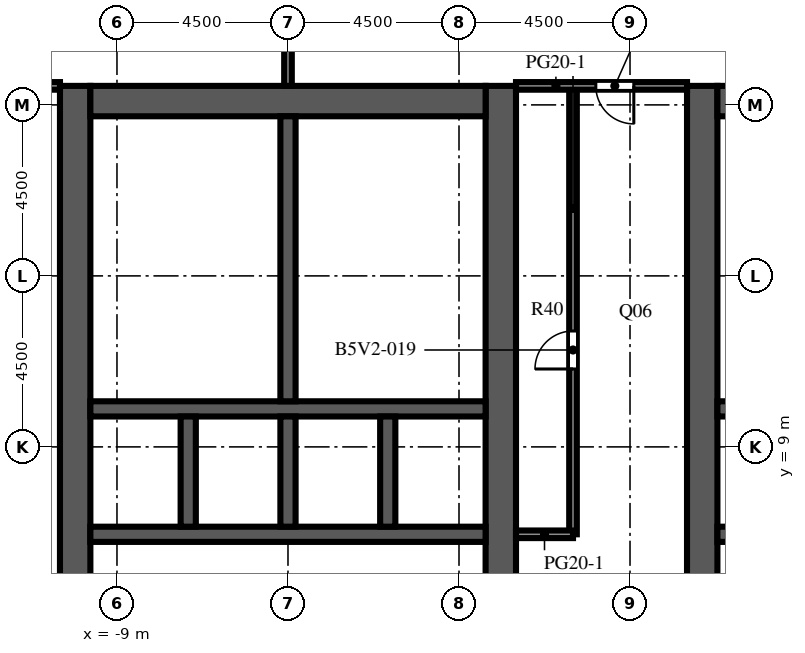
"""IFC4 building model, lengths in metres.
Left out: names, types, materials, properties, quantities, classifications, styles, units other than length and angle.
Written with IfcOpenShell. Run it as: python <this file> out.ifc"""

import sys

from ifc_helpers import new_model, si_unit, direction, frame, frame_2d, origin, place, context, subcontext, project, spatial, rectangle, extrude, element, fill, save


model = new_model("IFC4")
c1 = context("Model", 3, precision=1e-05, world=origin(), true_north=direction((0.0, 1.0)))
c2 = subcontext(c1, "Body", "Model", "MODEL_VIEW")
j1 = project(units=[si_unit("LENGTHUNIT", "METRE"), si_unit("PLANEANGLEUNIT", "RADIAN")], contexts=[c1])
p1 = place(None, origin())
s1 = spatial("IfcSite", under=j1, at=p1, CompositionType="ELEMENT")
p2 = place(p1, origin())
s2 = spatial("IfcBuilding", under=s1, at=p2, CompositionType="ELEMENT")
p3 = place(p2, frame((0.0, 0.0, 177.3)))
s3 = spatial("IfcBuildingStorey", under=s2, at=p3, CompositionType="ELEMENT", Elevation=177.3)
p4 = place(p3, frame((-10.1, -9.0, 0.0), z_axis=(0.0, 0.0, 1.0), x_axis=(0.0, 1.0, 0.0)))
e1 = element("IfcWall", 1, at=p4, inside=s3, PredefinedType="SHEAR", context=c2, shape_type="SweptSolid", body=[
    extrude(rectangle(XDim=27.5, YDim=0.8, at=frame_2d((13.75, 0.0))), origin(), (0.0, 0.0, 1.0), 4.1),
])
p5 = place(p4, frame((12.55, 0.0, 0.0)))
e2 = element("IfcOpeningElement", 2, at=p5, cuts=e1, PredefinedType="OPENING", context=c2, shape_type="SweptSolid", body=[
    extrude(rectangle(XDim=2.4, YDim=2.4, at=frame_2d((1.2, 1.2))), frame((0.0, 0.41, 0.0), z_axis=(0.0, -1.0, 0.0), x_axis=(1.0, 0.0, 0.0)), (0.0, 0.0, 1.0), 0.82),
])
p6 = place(p4, frame((6.825, 0.0, 0.0)))
e3 = element("IfcOpeningElement", 3, at=p6, cuts=e1, PredefinedType="OPENING", context=c2, shape_type="SweptSolid", body=[
    extrude(rectangle(XDim=1.2, YDim=2.1, at=frame_2d((0.6, 1.05))), frame((0.0, 0.41, 0.0), z_axis=(0.0, -1.0, 0.0), x_axis=(1.0, 0.0, 0.0)), (0.0, 0.0, 1.0), 0.82),
])
p7 = place(p4, frame((19.475, 0.0, 0.0)))
e4 = element("IfcOpeningElement", 4, at=p7, cuts=e1, PredefinedType="OPENING", context=c2, shape_type="SweptSolid", body=[
    extrude(rectangle(XDim=1.2, YDim=2.1, at=frame_2d((0.6, 1.05))), frame((0.0, 0.41, 0.0), z_axis=(0.0, -1.0, 0.0), x_axis=(1.0, 0.0, 0.0)), (0.0, 0.0, 1.0), 0.82),
])
p8 = place(p3, frame((1.1, -9.0, 0.0), z_axis=(0.0, 0.0, 1.0), x_axis=(0.0, 1.0, 0.0)))
e5 = element("IfcWall", 5, at=p8, inside=s3, PredefinedType="SHEAR", context=c2, shape_type="SweptSolid", body=[
    extrude(rectangle(XDim=27.5, YDim=0.8, at=frame_2d((13.75, 0.0))), origin(), (0.0, 0.0, 1.0), 4.1),
])
p9 = place(p8, frame((12.55, 0.0, 0.0)))
e6 = element("IfcOpeningElement", 6, at=p9, cuts=e5, PredefinedType="OPENING", context=c2, shape_type="SweptSolid", body=[
    extrude(rectangle(XDim=2.4, YDim=2.4, at=frame_2d((1.2, 1.2))), frame((0.0, 0.41, 0.0), z_axis=(0.0, -1.0, 0.0), x_axis=(1.0, 0.0, 0.0)), (0.0, 0.0, 1.0), 0.82),
])
p10 = place(p8, frame((3.85, 0.0, 0.0)))
e7 = element("IfcOpeningElement", 7, at=p10, cuts=e5, PredefinedType="OPENING", context=c2, shape_type="SweptSolid", body=[
    extrude(rectangle(XDim=0.95, YDim=2.1, at=frame_2d((0.475, 1.05))), frame((0.0, 0.41, 0.0), z_axis=(0.0, -1.0, 0.0), x_axis=(1.0, 0.0, 0.0)), (0.0, 0.0, 1.0), 0.82),
])
p11 = place(p8, frame((23.475, 0.0, 0.0)))
e8 = element("IfcOpeningElement", 8, at=p11, cuts=e5, PredefinedType="OPENING", context=c2, shape_type="SweptSolid", body=[
    extrude(rectangle(XDim=1.2, YDim=2.1, at=frame_2d((0.6, 1.05))), frame((0.0, 0.41, 0.0), z_axis=(0.0, -1.0, 0.0), x_axis=(1.0, 0.0, 0.0)), (0.0, 0.0, 1.0), 0.82),
])
p12 = place(p3, frame((-9.7, 18.1, 0.0), z_axis=(0.0, 0.0, 1.0), x_axis=(1.0, 0.0, 0.0)))
e9 = element("IfcWall", 9, at=p12, inside=s3, PredefinedType="SHEAR", context=c2, shape_type="SweptSolid", body=[
    extrude(rectangle(XDim=10.4, YDim=0.8, at=frame_2d((5.2, 0.0))), origin(), (0.0, 0.0, 1.0), 4.1),
])
p13 = place(p3, frame((-9.7, 6.7, 0.0), z_axis=(0.0, 0.0, 1.0), x_axis=(1.0, 0.0, 0.0)))
e10 = element("IfcWall", 10, at=p13, inside=s3, PredefinedType="SHEAR", context=c2, shape_type="SweptSolid", body=[
    extrude(rectangle(XDim=10.4, YDim=0.4, at=frame_2d((5.2, 0.0))), origin(), (0.0, 0.0, 1.0), 4.1),
])
p14 = place(p13, frame((3.337, 0.0, 0.0)))
e11 = element("IfcOpeningElement", 11, at=p14, cuts=e10, PredefinedType="OPENING", context=c2, shape_type="SweptSolid", body=[
    extrude(rectangle(XDim=1.1, YDim=2.1, at=frame_2d((0.55, 1.05))), frame((0.0, 0.21, 0.0), z_axis=(0.0, -1.0, 0.0), x_axis=(1.0, 0.0, 0.0)), (0.0, 0.0, 1.0), 0.42),
])
p15 = place(p13, frame((5.962, 0.0, 0.0)))
e12 = element("IfcOpeningElement", 12, at=p15, cuts=e10, PredefinedType="OPENING", context=c2, shape_type="SweptSolid", body=[
    extrude(rectangle(XDim=1.1, YDim=2.1, at=frame_2d((0.55, 1.05))), frame((0.0, 0.21, 0.0), z_axis=(0.0, -1.0, 0.0), x_axis=(1.0, 0.0, 0.0)), (0.0, 0.0, 1.0), 0.42),
])
p16 = place(p13, frame((8.663, 0.0, 0.0)))
e13 = element("IfcOpeningElement", 13, at=p16, cuts=e10, PredefinedType="OPENING", context=c2, shape_type="SweptSolid", body=[
    extrude(rectangle(XDim=1.1, YDim=2.1, at=frame_2d((0.55, 1.05))), frame((0.0, 0.21, 0.0), z_axis=(0.0, -1.0, 0.0), x_axis=(1.0, 0.0, 0.0)), (0.0, 0.0, 1.0), 0.42),
])
p17 = place(p13, frame((0.688, 0.0, 0.0)))
e14 = element("IfcOpeningElement", 14, at=p17, cuts=e10, PredefinedType="OPENING", context=c2, shape_type="SweptSolid", body=[
    extrude(rectangle(XDim=1.0, YDim=2.1, at=frame_2d((0.5, 1.05))), frame((0.0, 0.21, 0.0), z_axis=(0.0, -1.0, 0.0), x_axis=(1.0, 0.0, 0.0)), (0.0, 0.0, 1.0), 0.42),
])
p18 = place(p3, frame((-9.7, 10.0, 0.0), z_axis=(0.0, 0.0, 1.0), x_axis=(1.0, 0.0, 0.0)))
e15 = element("IfcWall", 15, at=p18, inside=s3, PredefinedType="SHEAR", context=c2, shape_type="SweptSolid", body=[
    extrude(rectangle(XDim=10.4, YDim=0.4, at=frame_2d((5.2, 0.0))), origin(), (0.0, 0.0, 1.0), 4.1),
])
for number, where, z_axis, x_axis in (
    (16, (-7.125, 6.9, 0.0), (0.0, 0.0, 1.0), (0.0, 1.0, 0.0)),
    (17, (-4.5, 6.9, 0.0), (0.0, 0.0, 1.0), (0.0, 1.0, 0.0)),
    (18, (-1.875, 6.9, 0.0), (0.0, 0.0, 1.0), (0.0, 1.0, 0.0)),
):
    element("IfcWall", number, at=place(p3, frame(where, z_axis=z_axis, x_axis=x_axis)), inside=s3, PredefinedType="SHEAR", context=c2, shape_type="SweptSolid", body=[
        extrude(rectangle(XDim=2.9, YDim=0.4, at=frame_2d((1.45, 0.0))), origin(), (0.0, 0.0, 1.0), 4.1),
    ])
p19 = place(p3, frame((-4.5, 10.2, 0.0), z_axis=(0.0, 0.0, 1.0), x_axis=(0.0, 1.0, 0.0)))
e19 = element("IfcWall", 19, at=p19, inside=s3, PredefinedType="SHEAR", context=c2, shape_type="SweptSolid", body=[
    extrude(rectangle(XDim=7.5, YDim=0.4, at=frame_2d((3.75, 0.0))), origin(), (0.0, 0.0, 1.0), 4.1),
])
p20 = place(p3, frame((6.4, -9.0, 0.0), z_axis=(0.0, 0.0, 1.0), x_axis=(0.0, 1.0, 0.0)))
e20 = element("IfcWall", 20, at=p20, inside=s3, PredefinedType="SHEAR", context=c2, shape_type="SweptSolid", body=[
    extrude(rectangle(XDim=27.5, YDim=0.8, at=frame_2d((13.75, 0.0))), origin(), (0.0, 0.0, 1.0), 4.1),
])
p21 = place(p20, frame((12.55, 0.0, 0.0)))
e21 = element("IfcOpeningElement", 21, at=p21, cuts=e20, PredefinedType="OPENING", context=c2, shape_type="SweptSolid", body=[
    extrude(rectangle(XDim=2.4, YDim=2.4, at=frame_2d((1.2, 1.2))), frame((0.0, 0.41, 0.0), z_axis=(0.0, -1.0, 0.0), x_axis=(1.0, 0.0, 0.0)), (0.0, 0.0, 1.0), 0.82),
])
p22 = place(p20, frame((3.85, 0.0, 0.0)))
e22 = element("IfcOpeningElement", 22, at=p22, cuts=e20, PredefinedType="OPENING", context=c2, shape_type="SweptSolid", body=[
    extrude(rectangle(XDim=0.95, YDim=2.1, at=frame_2d((0.475, 1.05))), frame((0.0, 0.41, 0.0), z_axis=(0.0, -1.0, 0.0), x_axis=(1.0, 0.0, 0.0)), (0.0, 0.0, 1.0), 0.82),
])
p23 = place(p20, frame((23.475, 0.0, 0.0)))
e23 = element("IfcOpeningElement", 23, at=p23, cuts=e20, PredefinedType="OPENING", context=c2, shape_type="SweptSolid", body=[
    extrude(rectangle(XDim=1.2, YDim=2.1, at=frame_2d((0.6, 1.05))), frame((0.0, 0.41, 0.0), z_axis=(0.0, -1.0, 0.0), x_axis=(1.0, 0.0, 0.0)), (0.0, 0.0, 1.0), 0.82),
])
p24 = place(p3, frame((6.8, 18.1, 0.0), z_axis=(0.0, 0.0, 1.0), x_axis=(1.0, 0.0, 0.0)))
e24 = element("IfcWall", 24, at=p24, inside=s3, PredefinedType="SHEAR", context=c2, shape_type="SweptSolid", body=[
    extrude(rectangle(XDim=10.4, YDim=0.8, at=frame_2d((5.2, 0.0))), origin(), (0.0, 0.0, 1.0), 4.1),
])
p25 = place(p3, frame((6.8, 6.7, 0.0), z_axis=(0.0, 0.0, 1.0), x_axis=(1.0, 0.0, 0.0)))
e25 = element("IfcWall", 25, at=p25, inside=s3, PredefinedType="SHEAR", context=c2, shape_type="SweptSolid", body=[
    extrude(rectangle(XDim=10.4, YDim=0.4, at=frame_2d((5.2, 0.0))), origin(), (0.0, 0.0, 1.0), 4.1),
])
p26 = place(p25, frame((3.337, 0.0, 0.0)))
e26 = element("IfcOpeningElement", 26, at=p26, cuts=e25, PredefinedType="OPENING", context=c2, shape_type="SweptSolid", body=[
    extrude(rectangle(XDim=1.1, YDim=2.1, at=frame_2d((0.55, 1.05))), frame((0.0, 0.21, 0.0), z_axis=(0.0, -1.0, 0.0), x_axis=(1.0, 0.0, 0.0)), (0.0, 0.0, 1.0), 0.42),
])
p27 = place(p25, frame((5.962, 0.0, 0.0)))
e27 = element("IfcOpeningElement", 27, at=p27, cuts=e25, PredefinedType="OPENING", context=c2, shape_type="SweptSolid", body=[
    extrude(rectangle(XDim=1.1, YDim=2.1, at=frame_2d((0.55, 1.05))), frame((0.0, 0.21, 0.0), z_axis=(0.0, -1.0, 0.0), x_axis=(1.0, 0.0, 0.0)), (0.0, 0.0, 1.0), 0.42),
])
p28 = place(p25, frame((8.663, 0.0, 0.0)))
e28 = element("IfcOpeningElement", 28, at=p28, cuts=e25, PredefinedType="OPENING", context=c2, shape_type="SweptSolid", body=[
    extrude(rectangle(XDim=1.1, YDim=2.1, at=frame_2d((0.55, 1.05))), frame((0.0, 0.21, 0.0), z_axis=(0.0, -1.0, 0.0), x_axis=(1.0, 0.0, 0.0)), (0.0, 0.0, 1.0), 0.42),
])
p29 = place(p25, frame((0.688, 0.0, 0.0)))
e29 = element("IfcOpeningElement", 29, at=p29, cuts=e25, PredefinedType="OPENING", context=c2, shape_type="SweptSolid", body=[
    extrude(rectangle(XDim=1.0, YDim=2.1, at=frame_2d((0.5, 1.05))), frame((0.0, 0.21, 0.0), z_axis=(0.0, -1.0, 0.0), x_axis=(1.0, 0.0, 0.0)), (0.0, 0.0, 1.0), 0.42),
])
p30 = place(p3, frame((6.8, 10.0, 0.0), z_axis=(0.0, 0.0, 1.0), x_axis=(1.0, 0.0, 0.0)))
e30 = element("IfcWall", 30, at=p30, inside=s3, PredefinedType="SHEAR", context=c2, shape_type="SweptSolid", body=[
    extrude(rectangle(XDim=10.4, YDim=0.4, at=frame_2d((5.2, 0.0))), origin(), (0.0, 0.0, 1.0), 4.1),
])
p31 = place(p3, frame((-0.6, 12.45, 0.0), z_axis=(0.0, 0.0, 1.0), x_axis=(1.0, 0.0, 0.0)))
e31 = element("IfcWall", 31, at=p31, inside=s3, PredefinedType="PARTITIONING", context=c2, shape_type="SweptSolid", body=[
    extrude(rectangle(XDim=1.3, YDim=0.1, at=frame_2d((0.65, 0.0))), origin(), (0.0, 0.0, 1.0), 3.65),
])
p32 = place(p31, frame((0.2, 0.0, 0.0)))
e32 = element("IfcOpeningElement", 32, at=p32, cuts=e31, PredefinedType="OPENING", context=c2, shape_type="SweptSolid", body=[
    extrude(rectangle(XDim=0.9, YDim=2.1, at=frame_2d((0.45, 1.05))), frame((0.0, 0.06, 0.0), z_axis=(0.0, -1.0, 0.0), x_axis=(1.0, 0.0, 0.0)), (0.0, 0.0, 1.0), 0.12),
])
p33 = place(p3, frame((-4.3, 12.45, 0.0), z_axis=(0.0, 0.0, 1.0), x_axis=(1.0, 0.0, 0.0)))
e33 = element("IfcWall", 33, at=p33, inside=s3, PredefinedType="PARTITIONING", context=c2, shape_type="SweptSolid", body=[
    extrude(rectangle(XDim=3.7, YDim=0.1, at=frame_2d((1.85, 0.0))), origin(), (0.0, 0.0, 1.0), 3.65),
])
p34 = place(p3, frame((-0.6, 12.45, 0.0), z_axis=(0.0, 0.0, 1.0), x_axis=(0.0, 1.0, 0.0)))
e34 = element("IfcWall", 34, at=p34, inside=s3, PredefinedType="PARTITIONING", context=c2, shape_type="SweptSolid", body=[
    extrude(rectangle(XDim=2.625, YDim=0.1, at=frame_2d((1.312, 0.0))), origin(), (0.0, 0.0, 1.0), 3.65),
])
p35 = place(p34, frame((0.812, 0.0, 0.0)))
e35 = element("IfcOpeningElement", 35, at=p35, cuts=e34, PredefinedType="OPENING", context=c2, shape_type="SweptSolid", body=[
    extrude(rectangle(XDim=1.0, YDim=2.1, at=frame_2d((0.5, 1.05))), frame((0.0, 0.06, 0.0), z_axis=(0.0, -1.0, 0.0), x_axis=(1.0, 0.0, 0.0)), (0.0, 0.0, 1.0), 0.12),
])
p36 = place(p3, frame((-0.6, 15.075, 0.0), z_axis=(0.0, 0.0, 1.0), x_axis=(0.0, 1.0, 0.0)))
e36 = element("IfcWall", 36, at=p36, inside=s3, PredefinedType="PARTITIONING", context=c2, shape_type="SweptSolid", body=[
    extrude(rectangle(XDim=2.625, YDim=0.1, at=frame_2d((1.312, 0.0))), origin(), (0.0, 0.0, 1.0), 3.65),
])
p37 = place(p36, frame((0.812, 0.0, 0.0)))
e37 = element("IfcOpeningElement", 37, at=p37, cuts=e36, PredefinedType="OPENING", context=c2, shape_type="SweptSolid", body=[
    extrude(rectangle(XDim=1.0, YDim=2.1, at=frame_2d((0.5, 1.05))), frame((0.0, 0.06, 0.0), z_axis=(0.0, -1.0, 0.0), x_axis=(1.0, 0.0, 0.0)), (0.0, 0.0, 1.0), 0.12),
])
p38 = place(p3, frame((-4.3, 15.075, 0.0), z_axis=(0.0, 0.0, 1.0), x_axis=(1.0, 0.0, 0.0)))
e38 = element("IfcWall", 38, at=p38, inside=s3, PredefinedType="PARTITIONING", context=c2, shape_type="SweptSolid", body=[
    extrude(rectangle(XDim=3.7, YDim=0.1, at=frame_2d((1.85, 0.0))), origin(), (0.0, 0.0, 1.0), 3.65),
])
p39 = place(p3, frame((6.8, 12.45, 0.0), z_axis=(0.0, 0.0, 1.0), x_axis=(1.0, 0.0, 0.0)))
e39 = element("IfcWall", 39, at=p39, inside=s3, PredefinedType="PARTITIONING", context=c2, shape_type="SweptSolid", body=[
    extrude(rectangle(XDim=1.3, YDim=0.1, at=frame_2d((0.65, 0.0))), origin(), (0.0, 0.0, 1.0), 3.65),
])
p40 = place(p39, frame((0.2, 0.0, 0.0)))
e40 = element("IfcOpeningElement", 40, at=p40, cuts=e39, PredefinedType="OPENING", context=c2, shape_type="SweptSolid", body=[
    extrude(rectangle(XDim=0.9, YDim=2.1, at=frame_2d((0.45, 1.05))), frame((0.0, 0.06, 0.0), z_axis=(0.0, -1.0, 0.0), x_axis=(1.0, 0.0, 0.0)), (0.0, 0.0, 1.0), 0.12),
])
p41 = place(p3, frame((-4.5, 18.5, 0.0), z_axis=(0.0, 0.0, 1.0), x_axis=(0.0, 1.0, 0.0)))
e41 = element("IfcWall", 41, at=p41, inside=s3, PredefinedType="PARTITIONING", context=c2, shape_type="SweptSolid", body=[
    extrude(rectangle(XDim=8.0, YDim=0.2, at=frame_2d((4.0, 0.0))), origin(), (0.0, 0.0, 1.0), 3.65),
])
p42 = place(p3, frame((3.0, 6.7, 0.0), z_axis=(0.0, 0.0, 1.0), x_axis=(0.0, 1.0, 0.0)))
e42 = element("IfcWall", 42, at=p42, inside=s3, PredefinedType="PARTITIONING", context=c2, shape_type="SweptSolid", body=[
    extrude(rectangle(XDim=11.8, YDim=0.2, at=frame_2d((5.9, 0.0))), origin(), (0.0, 0.0, 1.0), 3.65),
])
p43 = place(p42, frame((4.35, 0.0, 0.0)))
e43 = element("IfcOpeningElement", 43, at=p43, cuts=e42, PredefinedType="OPENING", context=c2, shape_type="SweptSolid", body=[
    extrude(rectangle(XDim=1.0, YDim=2.1, at=frame_2d((0.5, 1.05))), frame((0.0, 0.11, 0.0), z_axis=(0.0, -1.0, 0.0), x_axis=(1.0, 0.0, 0.0)), (0.0, 0.0, 1.0), 0.22),
])
p44 = place(p3, frame((1.5, 6.7, 0.0), z_axis=(0.0, 0.0, 1.0), x_axis=(1.0, 0.0, 0.0)))
e44 = element("IfcWall", 44, at=p44, inside=s3, PredefinedType="PARTITIONING", context=c2, shape_type="SweptSolid", body=[
    extrude(rectangle(XDim=1.5, YDim=0.2, at=frame_2d((0.75, 0.0))), origin(), (0.0, 0.0, 1.0), 3.65),
])
p45 = place(p3, frame((-13.5, 18.5, 0.0), z_axis=(0.0, 0.0, 1.0), x_axis=(1.0, 0.0, 0.0)))
e45 = element("IfcWall", 45, at=p45, inside=s3, PredefinedType="PARTITIONING", context=c2, shape_type="SweptSolid", body=[
    extrude(rectangle(XDim=3.0, YDim=0.2, at=frame_2d((1.5, 0.0))), origin(), (0.0, 0.0, 1.0), 3.65),
])
p46 = place(p45, frame((1.1, 0.0, 0.0)))
e46 = element("IfcOpeningElement", 46, at=p46, cuts=e45, PredefinedType="OPENING", context=c2, shape_type="SweptSolid", body=[
    extrude(rectangle(XDim=1.0, YDim=2.1, at=frame_2d((0.5, 1.05))), frame((0.0, 0.11, 0.0), z_axis=(0.0, -1.0, 0.0), x_axis=(1.0, 0.0, 0.0)), (0.0, 0.0, 1.0), 0.22),
])
p47 = place(p3, frame((1.5, 18.5, 0.0), z_axis=(0.0, 0.0, 1.0), x_axis=(1.0, 0.0, 0.0)))
e47 = element("IfcWall", 47, at=p47, inside=s3, PredefinedType="PARTITIONING", context=c2, shape_type="SweptSolid", body=[
    extrude(rectangle(XDim=4.5, YDim=0.2, at=frame_2d((2.25, 0.0))), origin(), (0.0, 0.0, 1.0), 3.65),
])
p48 = place(p47, frame((2.1, 0.0, 0.0)))
e48 = element("IfcOpeningElement", 48, at=p48, cuts=e47, PredefinedType="OPENING", context=c2, shape_type="SweptSolid", body=[
    extrude(rectangle(XDim=1.0, YDim=2.1, at=frame_2d((0.5, 1.05))), frame((0.0, 0.11, 0.0), z_axis=(0.0, -1.0, 0.0), x_axis=(1.0, 0.0, 0.0)), (0.0, 0.0, 1.0), 0.22),
])
p49 = place(p14, origin())
e49 = element("IfcDoor", 49, at=p49, inside=s3, OperationType="DOUBLE_DOOR_SLIDING", PredefinedType="DOOR", context=c2, shape_type="SweptSolid", body=[
    extrude(rectangle(XDim=1.1, YDim=2.1, at=frame_2d((0.55, 1.05))), frame((0.0, 0.025, 0.0), z_axis=(0.0, -1.0, 0.0), x_axis=(1.0, 0.0, 0.0)), (0.0, 0.0, 1.0), 0.05),
])
fill(e11, e49)
p50 = place(p15, origin())
e50 = element("IfcDoor", 50, at=p50, inside=s3, OperationType="DOUBLE_DOOR_SLIDING", PredefinedType="DOOR", context=c2, shape_type="SweptSolid", body=[
    extrude(rectangle(XDim=1.1, YDim=2.1, at=frame_2d((0.55, 1.05))), frame((0.0, 0.025, 0.0), z_axis=(0.0, -1.0, 0.0), x_axis=(1.0, 0.0, 0.0)), (0.0, 0.0, 1.0), 0.05),
])
fill(e12, e50)
p51 = place(p16, origin())
e51 = element("IfcDoor", 51, at=p51, inside=s3, OperationType="DOUBLE_DOOR_SLIDING", PredefinedType="DOOR", context=c2, shape_type="SweptSolid", body=[
    extrude(rectangle(XDim=1.1, YDim=2.1, at=frame_2d((0.55, 1.05))), frame((0.0, 0.025, 0.0), z_axis=(0.0, -1.0, 0.0), x_axis=(1.0, 0.0, 0.0)), (0.0, 0.0, 1.0), 0.05),
])
fill(e13, e51)
p52 = place(p5, origin())
e52 = element("IfcDoor", 52, at=p52, inside=s3, OperationType="DOUBLE_DOOR_DOUBLE_SWING", PredefinedType="DOOR", context=c2, shape_type="SweptSolid", body=[
    extrude(rectangle(XDim=2.4, YDim=2.4, at=frame_2d((1.2, 1.2))), frame((0.0, 0.025, 0.0), z_axis=(0.0, -1.0, 0.0), x_axis=(1.0, 0.0, 0.0)), (0.0, 0.0, 1.0), 0.05),
])
fill(e2, e52)
p53 = place(p9, origin())
e53 = element("IfcDoor", 53, at=p53, inside=s3, OperationType="DOUBLE_DOOR_DOUBLE_SWING", PredefinedType="DOOR", context=c2, shape_type="SweptSolid", body=[
    extrude(rectangle(XDim=2.4, YDim=2.4, at=frame_2d((1.2, 1.2))), frame((0.0, 0.025, 0.0), z_axis=(0.0, -1.0, 0.0), x_axis=(1.0, 0.0, 0.0)), (0.0, 0.0, 1.0), 0.05),
])
fill(e6, e53)
p54 = place(p21, origin())
e54 = element("IfcDoor", 54, at=p54, inside=s3, OperationType="DOUBLE_DOOR_DOUBLE_SWING", PredefinedType="DOOR", context=c2, shape_type="SweptSolid", body=[
    extrude(rectangle(XDim=2.4, YDim=2.4, at=frame_2d((1.2, 1.2))), frame((0.0, 0.025, 0.0), z_axis=(0.0, -1.0, 0.0), x_axis=(1.0, 0.0, 0.0)), (0.0, 0.0, 1.0), 0.05),
])
fill(e21, e54)
p55 = place(p7, origin())
e55 = element("IfcDoor", 55, at=p55, inside=s3, OperationType="SINGLE_SWING_LEFT", PredefinedType="DOOR", context=c2, shape_type="SweptSolid", body=[
    extrude(rectangle(XDim=1.2, YDim=2.1, at=frame_2d((0.6, 1.05))), frame((0.0, 0.025, 0.0), z_axis=(0.0, -1.0, 0.0), x_axis=(1.0, 0.0, 0.0)), (0.0, 0.0, 1.0), 0.05),
])
fill(e4, e55)
p56 = place(p17, origin())
e56 = element("IfcDoor", 56, at=p56, inside=s3, OperationType="SINGLE_SWING_LEFT", PredefinedType="DOOR", context=c2, shape_type="SweptSolid", body=[
    extrude(rectangle(XDim=1.0, YDim=2.1, at=frame_2d((0.5, 1.05))), frame((0.0, 0.025, 0.0), z_axis=(0.0, -1.0, 0.0), x_axis=(1.0, 0.0, 0.0)), (0.0, 0.0, 1.0), 0.05),
])
fill(e14, e56)
p57 = place(p32, origin())
e57 = element("IfcDoor", 57, at=p57, inside=s3, OperationType="SINGLE_SWING_LEFT", PredefinedType="DOOR", context=c2, shape_type="SweptSolid", body=[
    extrude(rectangle(XDim=0.9, YDim=2.1, at=frame_2d((0.45, 1.05))), frame((0.0, 0.025, 0.0), z_axis=(0.0, -1.0, 0.0), x_axis=(1.0, 0.0, 0.0)), (0.0, 0.0, 1.0), 0.05),
])
fill(e32, e57)
p58 = place(p11, origin())
e58 = element("IfcDoor", 58, at=p58, inside=s3, OperationType="SINGLE_SWING_RIGHT", PredefinedType="DOOR", context=c2, shape_type="SweptSolid", body=[
    extrude(rectangle(XDim=1.2, YDim=2.1, at=frame_2d((0.6, 1.05))), frame((0.0, 0.375, 0.0), z_axis=(0.0, -1.0, 0.0), x_axis=(1.0, 0.0, 0.0)), (0.0, 0.0, 1.0), 0.05),
])
fill(e8, e58)
p59 = place(p35, origin())
e59 = element("IfcDoor", 59, at=p59, inside=s3, OperationType="SINGLE_SWING_LEFT", PredefinedType="DOOR", context=c2, shape_type="SweptSolid", body=[
    extrude(rectangle(XDim=1.0, YDim=2.1, at=frame_2d((0.5, 1.05))), frame((0.0, 0.025, 0.0), z_axis=(0.0, -1.0, 0.0), x_axis=(1.0, 0.0, 0.0)), (0.0, 0.0, 1.0), 0.05),
])
fill(e35, e59)
p60 = place(p37, origin())
e60 = element("IfcDoor", 60, at=p60, inside=s3, OperationType="SINGLE_SWING_RIGHT", PredefinedType="DOOR", context=c2, shape_type="SweptSolid", body=[
    extrude(rectangle(XDim=1.0, YDim=2.1, at=frame_2d((0.5, 1.05))), frame((0.0, 0.025, 0.0), z_axis=(0.0, -1.0, 0.0), x_axis=(1.0, 0.0, 0.0)), (0.0, 0.0, 1.0), 0.05),
])
fill(e37, e60)
p61 = place(p23, origin())
e61 = element("IfcDoor", 61, at=p61, inside=s3, OperationType="SINGLE_SWING_LEFT", PredefinedType="DOOR", context=c2, shape_type="SweptSolid", body=[
    extrude(rectangle(XDim=1.2, YDim=2.1, at=frame_2d((0.6, 1.05))), frame((0.0, -0.325, 0.0), z_axis=(0.0, -1.0, 0.0), x_axis=(1.0, 0.0, 0.0)), (0.0, 0.0, 1.0), 0.05),
])
fill(e23, e61)
p62 = place(p43, origin())
e62 = element("IfcDoor", 62, at=p62, inside=s3, OperationType="SINGLE_SWING_LEFT", PredefinedType="DOOR", context=c2, shape_type="SweptSolid", body=[
    extrude(rectangle(XDim=1.0, YDim=2.1, at=frame_2d((0.5, 1.05))), frame((0.0, 0.025, 0.0), z_axis=(0.0, -1.0, 0.0), x_axis=(1.0, 0.0, 0.0)), (0.0, 0.0, 1.0), 0.05),
])
fill(e43, e62)
p63 = place(p48, origin())
e63 = element("IfcDoor", 63, at=p63, inside=s3, OperationType="SINGLE_SWING_RIGHT", PredefinedType="DOOR", context=c2, shape_type="SweptSolid", body=[
    extrude(rectangle(XDim=1.0, YDim=2.1, at=frame_2d((0.5, 1.05))), frame((0.0, 0.025, 0.0), z_axis=(0.0, -1.0, 0.0), x_axis=(1.0, 0.0, 0.0)), (0.0, 0.0, 1.0), 0.05),
])
fill(e48, e63)
save(model, sys.argv[1])
